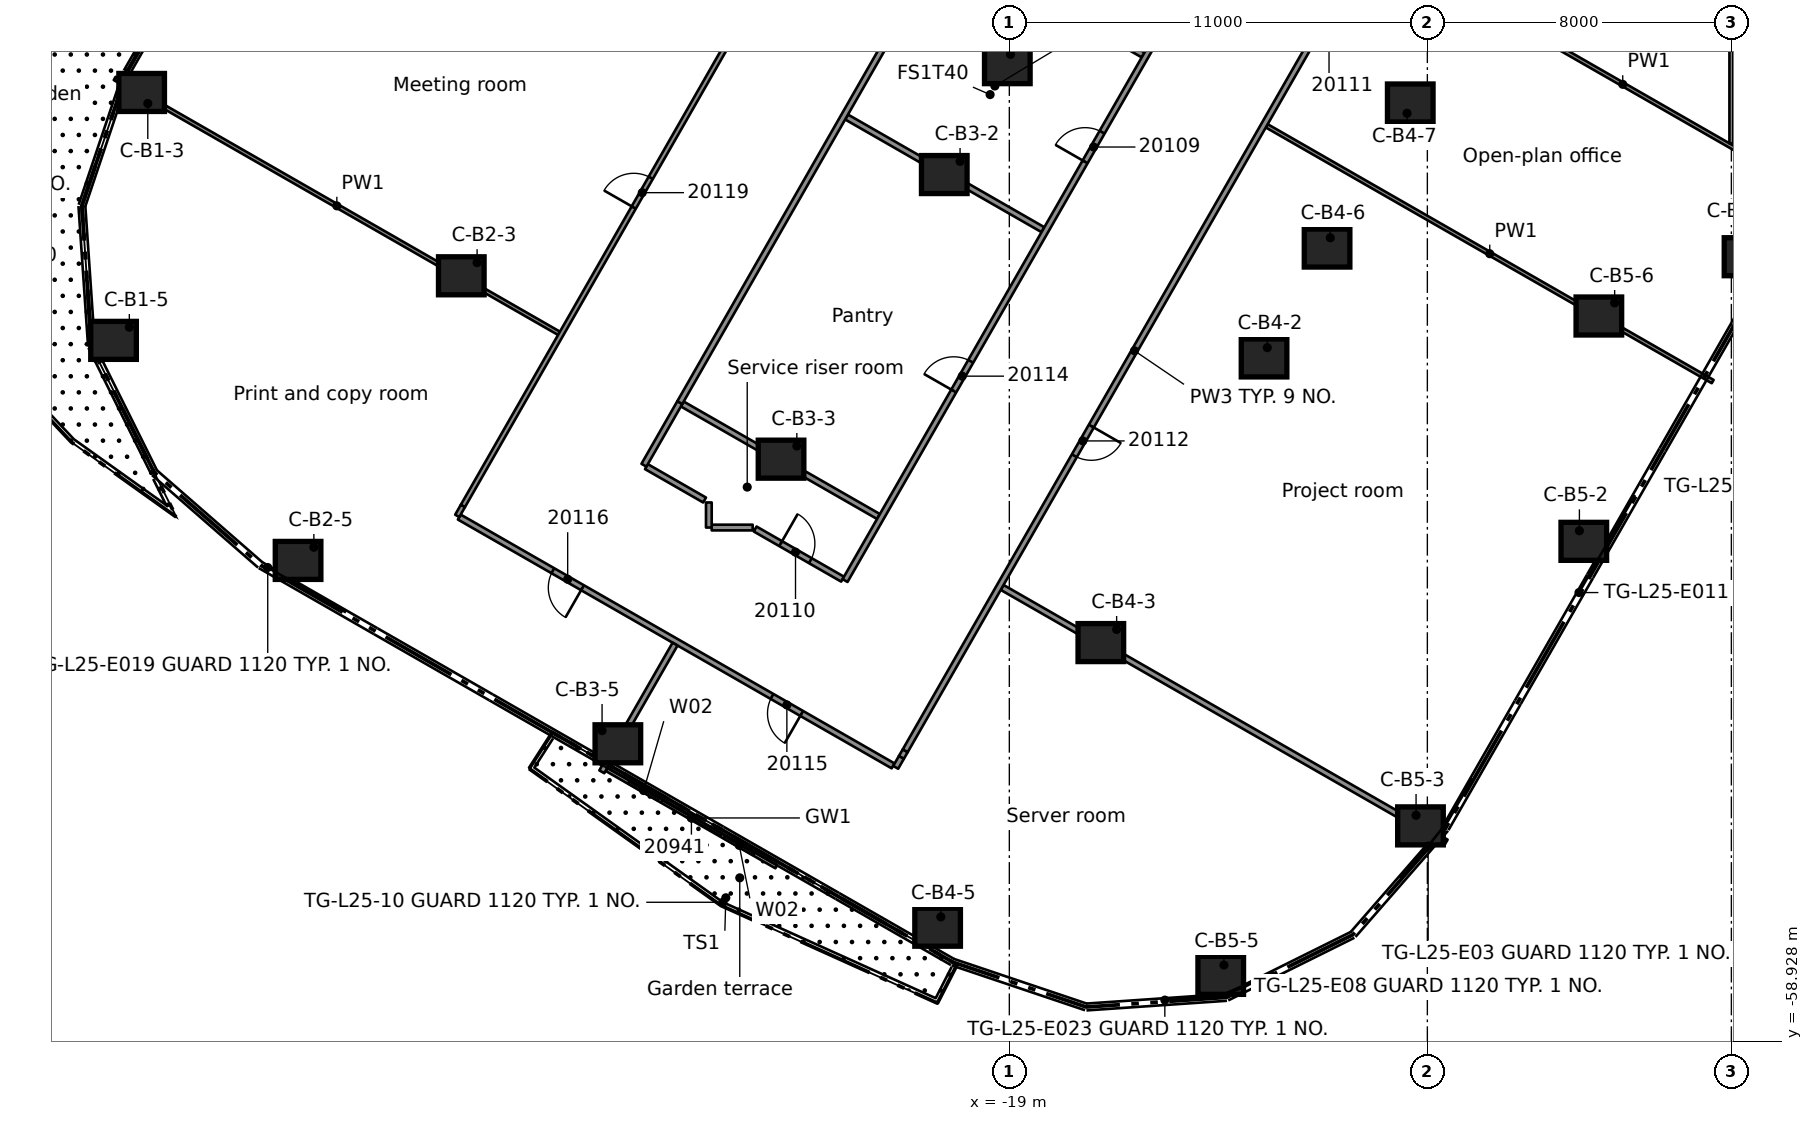
"""IFC4 building model, lengths in metres.
Left out: names, types, materials, properties, quantities, classifications, styles, units other than length and angle.
Written with IfcOpenShell. Run it as: python <this file> out.ifc"""

import sys

from ifc_helpers import new_model, si_unit, direction, frame, frame_2d, origin, origin_2d, place, context, subcontext, project, spatial, rectangle, extrude, element, fill, save


model = new_model("IFC4")
c1 = context("Model", 3, precision=1e-05, world=origin(), true_north=direction((0.0, 1.0)))
c2 = subcontext(c1, "Body", "Model", "MODEL_VIEW")
j1 = project(units=[si_unit("LENGTHUNIT", "METRE"), si_unit("PLANEANGLEUNIT", "RADIAN")], contexts=[c1])
p1 = place(None, origin())
s1 = spatial("IfcSite", under=j1, at=p1, CompositionType="ELEMENT")
p2 = place(p1, origin())
s2 = spatial("IfcBuilding", under=s1, at=p2, CompositionType="ELEMENT")
p3 = place(p2, frame((0.0, 0.0, 102.2)))
s3 = spatial("IfcBuildingStorey", under=s2, at=p3, CompositionType="ELEMENT", Elevation=102.2)
for number, where, z_axis, x_axis in (
    (1, (-41.832, -33.956, 0.0), (0.0, 0.0, 1.0), (1.0, 0.0, 0.0)),
    (2, (-42.572, -40.479, 0.0), (0.0, 0.0, 1.0), (1.0, 0.0, 0.0)),
    (3, (-33.421, -38.78, 0.0), (0.0, 0.0, 1.0), (1.0, 0.0, 0.0)),
    (4, (-37.716, -46.269, 0.0), (0.0, 0.0, 1.0), (1.0, 0.0, 0.0)),
    (5, (-20.712, -36.116, 0.0), (0.0, 0.0, 1.0), (1.0, 0.0, 0.0)),
    (6, (-25.007, -43.605, 0.0), (0.0, 0.0, 1.0), (1.0, 0.0, 0.0)),
    (7, (-29.301, -51.094, 0.0), (0.0, 0.0, 1.0), (1.0, 0.0, 0.0)),
    (8, (-19.053, -33.224, 0.0), (0.0, 0.0, 1.0), (1.0, 0.0, 0.0)),
    (9, (-12.297, -40.941, 0.0), (0.0, 0.0, 1.0), (1.0, 0.0, 0.0)),
    (10, (-16.592, -48.431, 0.0), (0.0, 0.0, 1.0), (1.0, 0.0, 0.0)),
    (11, (-20.887, -55.92, 0.0), (0.0, 0.0, 1.0), (1.0, 0.0, 0.0)),
    (12, (-10.639, -38.05, 0.0), (0.0, 0.0, 1.0), (1.0, 0.0, 0.0)),
    (13, (-8.45, -34.233, 0.0), (0.0, 0.0, 1.0), (1.0, 0.0, 0.0)),
    (14, (0.412, -38.278, 0.0), (0.0, 0.0, 1.0), (1.0, 0.0, 0.0)),
    (15, (-3.883, -45.767, 0.0), (0.0, 0.0, 1.0), (1.0, 0.0, 0.0)),
    (16, (-8.181, -53.254, 0.0), (0.0, 0.0, 1.0), (1.0, 0.0, 0.0)),
    (17, (-13.437, -57.187, 0.0), (0.0, 0.0, 1.0), (1.0, 0.0, 0.0)),
    (18, (-3.487, -39.838, 0.0), (0.0, 0.0, 1.0), (1.0, 0.0, 0.0)),
):
    element("IfcColumn", number, at=place(p3, frame(where, z_axis=z_axis, x_axis=x_axis)), inside=s3, PredefinedType="COLUMN", context=c2, shape_type="SweptSolid", body=[
        extrude(rectangle(XDim=1.2, YDim=1.0, at=origin_2d()), origin(), (0.0, 0.0, 1.0), 3.5),
    ])
p4 = place(p3, frame((-25.132, -54.327, 0.0), z_axis=(0.0, 0.0, 1.0), x_axis=(-0.867469059899, 0.497491135718, 0.0)))
e19 = element("IfcWall", 19, at=p4, inside=s3, PredefinedType="STANDARD", context=c2, shape_type="SweptSolid", body=[
    extrude(rectangle(XDim=5.15, YDim=0.1, at=frame_2d((2.575, 0.0))), origin(), (0.0, 0.0, 1.0), 3.1),
])
p5 = place(p4, frame((1.675, 0.0, 0.0)))
e20 = element("IfcOpeningElement", 20, at=p5, cuts=e19, PredefinedType="OPENING", context=c2, shape_type="SweptSolid", body=[
    extrude(rectangle(XDim=1.8, YDim=2.4, at=frame_2d((0.9, 1.2))), frame((0.0, 0.06, 0.0), z_axis=(0.0, -1.0, 0.0), x_axis=(1.0, 0.0, 0.0)), (0.0, 0.0, 1.0), 0.12),
])
p6 = place(p4, frame((0.675, 0.0, 0.0)))
e21 = element("IfcOpeningElement", 21, at=p6, cuts=e19, PredefinedType="OPENING", context=c2, shape_type="SweptSolid", body=[
    extrude(rectangle(XDim=0.9, YDim=2.4, at=frame_2d((0.45, 1.2))), frame((0.0, 0.06, 0.0), z_axis=(0.0, -1.0, 0.0), x_axis=(1.0, 0.0, 0.0)), (0.0, 0.0, 1.0), 0.12),
])
p7 = place(p4, frame((3.575, 0.0, 0.0)))
e22 = element("IfcOpeningElement", 22, at=p7, cuts=e19, PredefinedType="OPENING", context=c2, shape_type="SweptSolid", body=[
    extrude(rectangle(XDim=0.9, YDim=2.4, at=frame_2d((0.45, 1.2))), frame((0.0, 0.06, 0.0), z_axis=(0.0, -1.0, 0.0), x_axis=(1.0, 0.0, 0.0)), (0.0, 0.0, 1.0), 0.12),
])
p8 = place(p3, frame((-22.059, -51.675, 0.0), z_axis=(0.0, 0.0, 1.0), x_axis=(-0.867448548379, 0.49752689969, 0.0)))
e23 = element("IfcWall", 23, at=p8, inside=s3, PredefinedType="PARTITIONING", context=c2, shape_type="SweptSolid", body=[
    extrude(rectangle(XDim=13.159, YDim=0.15, at=frame_2d((6.58, 0.0))), origin(), (0.0, 0.0, 1.0), 3.08),
])
p9 = place(p8, frame((2.772, 0.0, 0.0)))
e24 = element("IfcOpeningElement", 24, at=p9, cuts=e23, PredefinedType="OPENING", context=c2, shape_type="SweptSolid", body=[
    extrude(rectangle(XDim=0.9, YDim=2.1, at=frame_2d((0.45, 1.05))), frame((0.0, 0.085, 0.0), z_axis=(0.0, -1.0, 0.0), x_axis=(1.0, 0.0, 0.0)), (0.0, 0.0, 1.0), 0.17),
])
p10 = place(p8, frame((9.421, 0.0, 0.0)))
e25 = element("IfcOpeningElement", 25, at=p10, cuts=e23, PredefinedType="OPENING", context=c2, shape_type="SweptSolid", body=[
    extrude(rectangle(XDim=0.9, YDim=2.1, at=frame_2d((0.45, 1.05))), frame((0.0, 0.085, 0.0), z_axis=(0.0, -1.0, 0.0), x_axis=(1.0, 0.0, 0.0)), (0.0, 0.0, 1.0), 0.17),
])
p11 = place(p3, frame((-28.55, -43.801, 0.0), z_axis=(0.0, 0.0, 1.0), x_axis=(0.86725420263, -0.497865592325, 0.0)))
e26 = element("IfcWall", 26, at=p11, inside=s3, PredefinedType="PARTITIONING", context=c2, shape_type="SweptSolid", body=[
    extrude(rectangle(XDim=1.765, YDim=0.15, at=frame_2d((0.883, 0.0))), origin(), (0.0, 0.0, 1.0), 3.08),
])
p12 = place(p3, frame((-25.689, -45.442, 0.0), z_axis=(0.0, 0.0, 1.0), x_axis=(0.867398027083, -0.497614974264, 0.0)))
e27 = element("IfcWall", 27, at=p12, inside=s3, PredefinedType="PARTITIONING", context=c2, shape_type="SweptSolid", body=[
    extrude(rectangle(XDim=2.653, YDim=0.15, at=frame_2d((1.326, 0.0))), origin(), (0.0, 0.0, 1.0), 3.08),
])
p13 = place(p12, frame((0.775, 0.0, 0.0)))
e28 = element("IfcOpeningElement", 28, at=p13, cuts=e27, PredefinedType="OPENING", context=c2, shape_type="SweptSolid", body=[
    extrude(rectangle(XDim=0.9, YDim=2.1, at=frame_2d((0.45, 1.05))), frame((0.0, 0.085, 0.0), z_axis=(0.0, -1.0, 0.0), x_axis=(1.0, 0.0, 0.0)), (0.0, 0.0, 1.0), 0.17),
])
p14 = place(p3, frame((-42.542, -33.587, 0.0), z_axis=(0.0, 0.0, 1.0), x_axis=(0.867443920759, -0.497534967956, 0.0)))
e29 = element("IfcWall", 29, at=p14, inside=s3, PredefinedType="PARTITIONING", context=c2, shape_type="SweptSolid", body=[
    extrude(rectangle(XDim=13.479, YDim=0.1, at=frame_2d((6.739, 0.0))), origin(), (0.0, 0.0, 1.0), 3.08),
])
p15 = place(p3, frame((-27.606, -42.153, 0.0), z_axis=(0.0, 0.0, 1.0), x_axis=(0.867464576118, -0.497498953949, 0.0)))
e30 = element("IfcWall", 30, at=p15, inside=s3, PredefinedType="PARTITIONING", context=c2, shape_type="SweptSolid", body=[
    extrude(rectangle(XDim=5.952, YDim=0.15, at=frame_2d((2.976, 0.0))), origin(), (0.0, 0.0, 1.0), 3.08),
])
p16 = place(p3, frame((-19.189, -46.98, 0.0), z_axis=(0.0, 0.0, 1.0), x_axis=(0.867482561881, -0.497467591742, 0.0)))
e31 = element("IfcWall", 31, at=p16, inside=s3, PredefinedType="PARTITIONING", context=c2, shape_type="SweptSolid", body=[
    extrude(rectangle(XDim=13.47, YDim=0.15, at=frame_2d((6.735, 0.0))), origin(), (0.0, 0.0, 1.0), 3.08),
])
p17 = place(p3, frame((-23.283, -34.602, 0.0), z_axis=(0.0, 0.0, 1.0), x_axis=(0.867394604178, -0.497620940719, 0.0)))
e32 = element("IfcWall", 32, at=p17, inside=s3, PredefinedType="PARTITIONING", context=c2, shape_type="SweptSolid", body=[
    extrude(rectangle(XDim=5.958, YDim=0.15, at=frame_2d((2.979, 0.0))), origin(), (0.0, 0.0, 1.0), 3.08),
])
p18 = place(p3, frame((-20.65, -30.003, 0.0), z_axis=(0.0, 0.0, 1.0), x_axis=(0.867468461176, -0.497492179703, 0.0)))
e33 = element("IfcWall", 33, at=p18, inside=s3, PredefinedType="PARTITIONING", context=c2, shape_type="SweptSolid", body=[
    extrude(rectangle(XDim=5.962, YDim=0.15, at=frame_2d((2.981, 0.0))), origin(), (0.0, 0.0, 1.0), 3.08),
])
p19 = place(p3, frame((-12.225, -34.835, 0.0), z_axis=(0.0, 0.0, 1.0), x_axis=(0.867497921586, -0.497440806573, 0.0)))
e34 = element("IfcWall", 34, at=p19, inside=s3, PredefinedType="PARTITIONING", context=c2, shape_type="SweptSolid", body=[
    extrude(rectangle(XDim=13.525, YDim=0.1, at=frame_2d((6.763, 0.0))), origin(), (0.0, 0.0, 1.0), 3.08),
])
p20 = place(p3, frame((-8.015, -30.785, 0.0), z_axis=(0.0, 0.0, 1.0), x_axis=(0.867483873935, -0.497465303778, 0.0)))
e35 = element("IfcWall", 35, at=p20, inside=s3, PredefinedType="PARTITIONING", context=c2, shape_type="SweptSolid", body=[
    extrude(rectangle(XDim=11.888, YDim=0.1, at=frame_2d((5.944, 0.0))), origin(), (0.0, 0.0, 1.0), 3.08),
])
p21 = place(p3, frame((-26.832, -45.404, 0.0), z_axis=(0.0, 0.0, 1.0), x_axis=(1.0, 0.0, 0.0)))
e36 = element("IfcWall", 36, at=p21, inside=s3, PredefinedType="PARTITIONING", context=c2, shape_type="SweptSolid", body=[
    extrude(rectangle(XDim=1.078, YDim=0.15, at=frame_2d((0.539, 0.0))), origin(), (0.0, 0.0, 1.0), 3.08),
])
p22 = place(p3, frame((-21.841, -51.453, 0.0), z_axis=(0.0, 0.0, 1.0), x_axis=(0.502077562302, 0.864822595353, 0.0)))
e37 = element("IfcWall", 37, at=p22, inside=s3, PredefinedType="PARTITIONING", context=c2, shape_type="SweptSolid", body=[
    extrude(rectangle(XDim=0.203, YDim=0.15, at=frame_2d((0.102, 0.0))), origin(), (0.0, 0.0, 1.0), 3.08),
])
p23 = place(p3, frame((-9.673, -30.229, 0.0), z_axis=(0.0, 0.0, 1.0), x_axis=(-0.497332712809, -0.867559895783, 0.0)))
e38 = element("IfcWall", 38, at=p23, inside=s3, PredefinedType="PARTITIONING", context=c2, shape_type="SweptSolid", body=[
    extrude(rectangle(XDim=24.261, YDim=0.15, at=frame_2d((12.131, 0.0))), origin(), (0.0, 0.0, 1.0), 3.08),
])
p24 = place(p23, frame((1.288, 0.0, 0.0)))
e39 = element("IfcOpeningElement", 39, at=p24, cuts=e38, PredefinedType="OPENING", context=c2, shape_type="SweptSolid", body=[
    extrude(rectangle(XDim=1.1, YDim=2.1, at=frame_2d((0.55, 1.05))), frame((0.0, 0.085, 0.0), z_axis=(0.0, -1.0, 0.0), x_axis=(1.0, 0.0, 0.0)), (0.0, 0.0, 1.0), 0.17),
])
p25 = place(p23, frame((14.415, 0.0, 0.0)))
e40 = element("IfcOpeningElement", 40, at=p25, cuts=e38, PredefinedType="OPENING", context=c2, shape_type="SweptSolid", body=[
    extrude(rectangle(XDim=0.9, YDim=2.1, at=frame_2d((0.45, 1.05))), frame((0.0, 0.085, 0.0), z_axis=(0.0, -1.0, 0.0), x_axis=(1.0, 0.0, 0.0)), (0.0, 0.0, 1.0), 0.17),
])
p26 = place(p3, frame((-23.323, -46.799, 0.0), z_axis=(0.0, 0.0, 1.0), x_axis=(0.497421315986, 0.867509097591, 0.0)))
e41 = element("IfcWall", 41, at=p26, inside=s3, PredefinedType="PARTITIONING", context=c2, shape_type="SweptSolid", body=[
    extrude(rectangle(XDim=21.006, YDim=0.15, at=frame_2d((10.503, 0.0))), origin(), (0.0, 0.0, 1.0), 3.08),
])
p27 = place(p26, frame((12.7, 0.0, 0.0)))
e42 = element("IfcOpeningElement", 42, at=p27, cuts=e41, PredefinedType="OPENING", context=c2, shape_type="SweptSolid", body=[
    extrude(rectangle(XDim=0.9, YDim=2.1, at=frame_2d((0.45, 1.05))), frame((0.0, 0.085, 0.0), z_axis=(0.0, -1.0, 0.0), x_axis=(1.0, 0.0, 0.0)), (0.0, 0.0, 1.0), 0.17),
])
p28 = place(p26, frame((5.75, 0.0, 0.0)))
e43 = element("IfcOpeningElement", 43, at=p28, cuts=e41, PredefinedType="OPENING", context=c2, shape_type="SweptSolid", body=[
    extrude(rectangle(XDim=0.9, YDim=2.1, at=frame_2d((0.45, 1.05))), frame((0.0, 0.085, 0.0), z_axis=(0.0, -1.0, 0.0), x_axis=(1.0, 0.0, 0.0)), (0.0, 0.0, 1.0), 0.17),
])
p29 = place(p3, frame((-29.724, -51.831, 0.0), z_axis=(0.0, 0.0, 1.0), x_axis=(0.497726194035, 0.867334212269, 0.0)))
e44 = element("IfcWall", 44, at=p29, inside=s3, PredefinedType="PARTITIONING", context=c2, shape_type="SweptSolid", body=[
    extrude(rectangle(XDim=3.874, YDim=0.15, at=frame_2d((1.937, 0.0))), origin(), (0.0, 0.0, 1.0), 3.08),
])
p30 = place(p3, frame((-28.615, -43.764, 0.0), z_axis=(0.0, 0.0, 1.0), x_axis=(0.497093846187, 0.867696783492, 0.0)))
e45 = element("IfcWall", 45, at=p30, inside=s3, PredefinedType="PARTITIONING", context=c2, shape_type="SweptSolid", body=[
    extrude(rectangle(XDim=1.899, YDim=0.15, at=frame_2d((0.95, 0.0))), origin(), (0.0, 0.0, 1.0), 3.08),
])
p31 = place(p3, frame((-16.8, -23.128, 0.0), z_axis=(0.0, 0.0, 1.0), x_axis=(-0.496846554385, -0.867838407422, 0.0)))
e46 = element("IfcWall", 46, at=p31, inside=s3, PredefinedType="PARTITIONING", context=c2, shape_type="SweptSolid", body=[
    extrude(rectangle(XDim=21.88, YDim=0.15, at=frame_2d((10.94, 0.0))), origin(), (0.0, 0.0, 1.0), 3.08),
])
p32 = place(p31, frame((4.622, 0.0, 0.0)))
e47 = element("IfcOpeningElement", 47, at=p32, cuts=e46, PredefinedType="OPENING", context=c2, shape_type="SweptSolid", body=[
    extrude(rectangle(XDim=0.9, YDim=2.1, at=frame_2d((0.45, 1.05))), frame((0.0, 0.085, 0.0), z_axis=(0.0, -1.0, 0.0), x_axis=(1.0, 0.0, 0.0)), (0.0, 0.0, 1.0), 0.17),
])
p33 = place(p3, frame((-33.38, -44.837, 0.0), z_axis=(0.0, 0.0, 1.0), x_axis=(0.496890503853, 0.867813244414, 0.0)))
e48 = element("IfcWall", 48, at=p33, inside=s3, PredefinedType="PARTITIONING", context=c2, shape_type="SweptSolid", body=[
    extrude(rectangle(XDim=19.201, YDim=0.125, at=frame_2d((9.601, 0.0))), origin(), (0.0, 0.0, 1.0), 3.08),
])
p34 = place(p33, frame((16.0, 0.0, 0.0)))
e49 = element("IfcOpeningElement", 49, at=p34, cuts=e48, PredefinedType="OPENING", context=c2, shape_type="SweptSolid", body=[
    extrude(rectangle(XDim=1.1, YDim=2.1, at=frame_2d((0.55, 1.05))), frame((0.0, 0.073, 0.0), z_axis=(0.0, -1.0, 0.0), x_axis=(1.0, 0.0, 0.0)), (0.0, 0.0, 1.0), 0.145),
])
p35 = place(p33, frame((9.05, 0.0, 0.0)))
e50 = element("IfcOpeningElement", 50, at=p35, cuts=e48, PredefinedType="OPENING", context=c2, shape_type="SweptSolid", body=[
    extrude(rectangle(XDim=0.9, YDim=2.1, at=frame_2d((0.45, 1.05))), frame((0.0, 0.073, 0.0), z_axis=(0.0, -1.0, 0.0), x_axis=(1.0, 0.0, 0.0)), (0.0, 0.0, 1.0), 0.145),
])
p36 = place(p3, frame((-21.99, -51.714, 0.0), z_axis=(0.0, 0.0, 1.0), x_axis=(0.495264323533, 0.868742338001, 0.0)))
e51 = element("IfcWall", 51, at=p36, inside=s3, PredefinedType="PARTITIONING", context=c2, shape_type="SweptSolid", body=[
    extrude(rectangle(XDim=0.301, YDim=0.15, at=frame_2d((0.15, 0.0))), origin(), (0.0, 0.0, 1.0), 3.08),
])
p37 = place(p3, frame((-33.528, -45.097, 0.0), z_axis=(0.0, 0.0, 1.0), x_axis=(0.49517225761, 0.868794817718, 0.0)))
e52 = element("IfcWall", 52, at=p37, inside=s3, PredefinedType="PARTITIONING", context=c2, shape_type="SweptSolid", body=[
    extrude(rectangle(XDim=0.299, YDim=0.125, at=frame_2d((0.15, 0.0))), origin(), (0.0, 0.0, 1.0), 3.08),
])
p38 = place(p3, frame((-0.001, -35.295, 0.0), z_axis=(0.0, 0.0, 1.0), x_axis=(4.8266042e-05, 0.999999998835, 0.0)))
e53 = element("IfcWall", 53, at=p38, inside=s3, PredefinedType="PARTITIONING", context=c2, shape_type="SweptSolid", body=[
    extrude(rectangle(XDim=20.233, YDim=0.1, at=frame_2d((10.116, 0.0))), origin(), (0.0, 0.0, 1.0), 3.08),
])
p39 = place(p3, frame((-26.907, -45.404, 0.0), z_axis=(0.0, 0.0, 1.0), x_axis=(0.0, 1.0, 0.0)))
e54 = element("IfcWall", 54, at=p39, inside=s3, PredefinedType="PARTITIONING", context=c2, shape_type="SweptSolid", body=[
    extrude(rectangle(XDim=0.66, YDim=0.15, at=frame_2d((0.33, 0.0))), origin(), (0.0, 0.0, 1.0), 3.08),
])
p40 = place(p5, origin())
e55 = element("IfcDoor", 55, at=p40, inside=s3, OperationType="DOUBLE_DOOR_SLIDING", PredefinedType="DOOR", context=c2, shape_type="SweptSolid", body=[
    extrude(rectangle(XDim=1.8, YDim=2.4, at=frame_2d((0.9, 1.2))), frame((0.0, 0.025, 0.0), z_axis=(0.0, -1.0, 0.0), x_axis=(1.0, 0.0, 0.0)), (0.0, 0.0, 1.0), 0.05),
])
fill(e20, e55)
p41 = place(p6, origin())
e56 = element("IfcWindow", 56, at=p41, inside=s3, PartitioningType="SINGLE_PANEL", PredefinedType="WINDOW", context=c2, shape_type="SweptSolid", body=[
    extrude(rectangle(XDim=0.9, YDim=2.4, at=frame_2d((0.45, 1.2))), frame((0.0, 0.03, 0.0), z_axis=(0.0, -1.0, 0.0), x_axis=(1.0, 0.0, 0.0)), (0.0, 0.0, 1.0), 0.06),
])
fill(e21, e56)
p42 = place(p7, origin())
e57 = element("IfcWindow", 57, at=p42, inside=s3, PartitioningType="SINGLE_PANEL", PredefinedType="WINDOW", context=c2, shape_type="SweptSolid", body=[
    extrude(rectangle(XDim=0.9, YDim=2.4, at=frame_2d((0.45, 1.2))), frame((0.0, 0.03, 0.0), z_axis=(0.0, -1.0, 0.0), x_axis=(1.0, 0.0, 0.0)), (0.0, 0.0, 1.0), 0.06),
])
fill(e22, e57)
p43 = place(p27, origin())
e58 = element("IfcDoor", 58, at=p43, inside=s3, OperationType="SINGLE_SWING_RIGHT", PredefinedType="DOOR", context=c2, shape_type="SweptSolid", body=[
    extrude(rectangle(XDim=0.9, YDim=2.1, at=frame_2d((0.45, 1.05))), frame((0.0, 0.025, 0.0), z_axis=(0.0, -1.0, 0.0), x_axis=(1.0, 0.0, 0.0)), (0.0, 0.0, 1.0), 0.05),
])
fill(e42, e58)
p44 = place(p13, origin())
e59 = element("IfcDoor", 59, at=p44, inside=s3, OperationType="SINGLE_SWING_LEFT", PredefinedType="DOOR", context=c2, shape_type="SweptSolid", body=[
    extrude(rectangle(XDim=0.9, YDim=2.1, at=frame_2d((0.45, 1.05))), frame((0.0, 0.025, 0.0), z_axis=(0.0, -1.0, 0.0), x_axis=(1.0, 0.0, 0.0)), (0.0, 0.0, 1.0), 0.05),
])
fill(e28, e59)
p45 = place(p25, origin())
e60 = element("IfcDoor", 60, at=p45, inside=s3, OperationType="SINGLE_SWING_RIGHT", PredefinedType="DOOR", context=c2, shape_type="SweptSolid", body=[
    extrude(rectangle(XDim=0.9, YDim=2.1, at=frame_2d((0.45, 1.05))), frame((0.0, 0.025, 0.0), z_axis=(0.0, -1.0, 0.0), x_axis=(1.0, 0.0, 0.0)), (0.0, 0.0, 1.0), 0.05),
])
fill(e40, e60)
p46 = place(p28, origin())
e61 = element("IfcDoor", 61, at=p46, inside=s3, OperationType="SINGLE_SWING_LEFT", PredefinedType="DOOR", context=c2, shape_type="SweptSolid", body=[
    extrude(rectangle(XDim=0.9, YDim=2.1, at=frame_2d((0.45, 1.05))), frame((0.0, 0.025, 0.0), z_axis=(0.0, -1.0, 0.0), x_axis=(1.0, 0.0, 0.0)), (0.0, 0.0, 1.0), 0.05),
])
fill(e43, e61)
p47 = place(p9, origin())
e62 = element("IfcDoor", 62, at=p47, inside=s3, OperationType="SINGLE_SWING_LEFT", PredefinedType="DOOR", context=c2, shape_type="SweptSolid", body=[
    extrude(rectangle(XDim=0.9, YDim=2.1, at=frame_2d((0.45, 1.05))), frame((0.0, 0.025, 0.0), z_axis=(0.0, -1.0, 0.0), x_axis=(1.0, 0.0, 0.0)), (0.0, 0.0, 1.0), 0.05),
])
fill(e24, e62)
p48 = place(p10, origin())
e63 = element("IfcDoor", 63, at=p48, inside=s3, OperationType="SINGLE_SWING_RIGHT", PredefinedType="DOOR", context=c2, shape_type="SweptSolid", body=[
    extrude(rectangle(XDim=0.9, YDim=2.1, at=frame_2d((0.45, 1.05))), frame((0.0, 0.025, 0.0), z_axis=(0.0, -1.0, 0.0), x_axis=(1.0, 0.0, 0.0)), (0.0, 0.0, 1.0), 0.05),
])
fill(e25, e63)
p49 = place(p35, origin())
e64 = element("IfcDoor", 64, at=p49, inside=s3, OperationType="SINGLE_SWING_LEFT", PredefinedType="DOOR", context=c2, shape_type="SweptSolid", body=[
    extrude(rectangle(XDim=0.9, YDim=2.1, at=frame_2d((0.45, 1.05))), frame((0.0, 0.025, 0.0), z_axis=(0.0, -1.0, 0.0), x_axis=(1.0, 0.0, 0.0)), (0.0, 0.0, 1.0), 0.05),
])
fill(e50, e64)
save(model, sys.argv[1])
